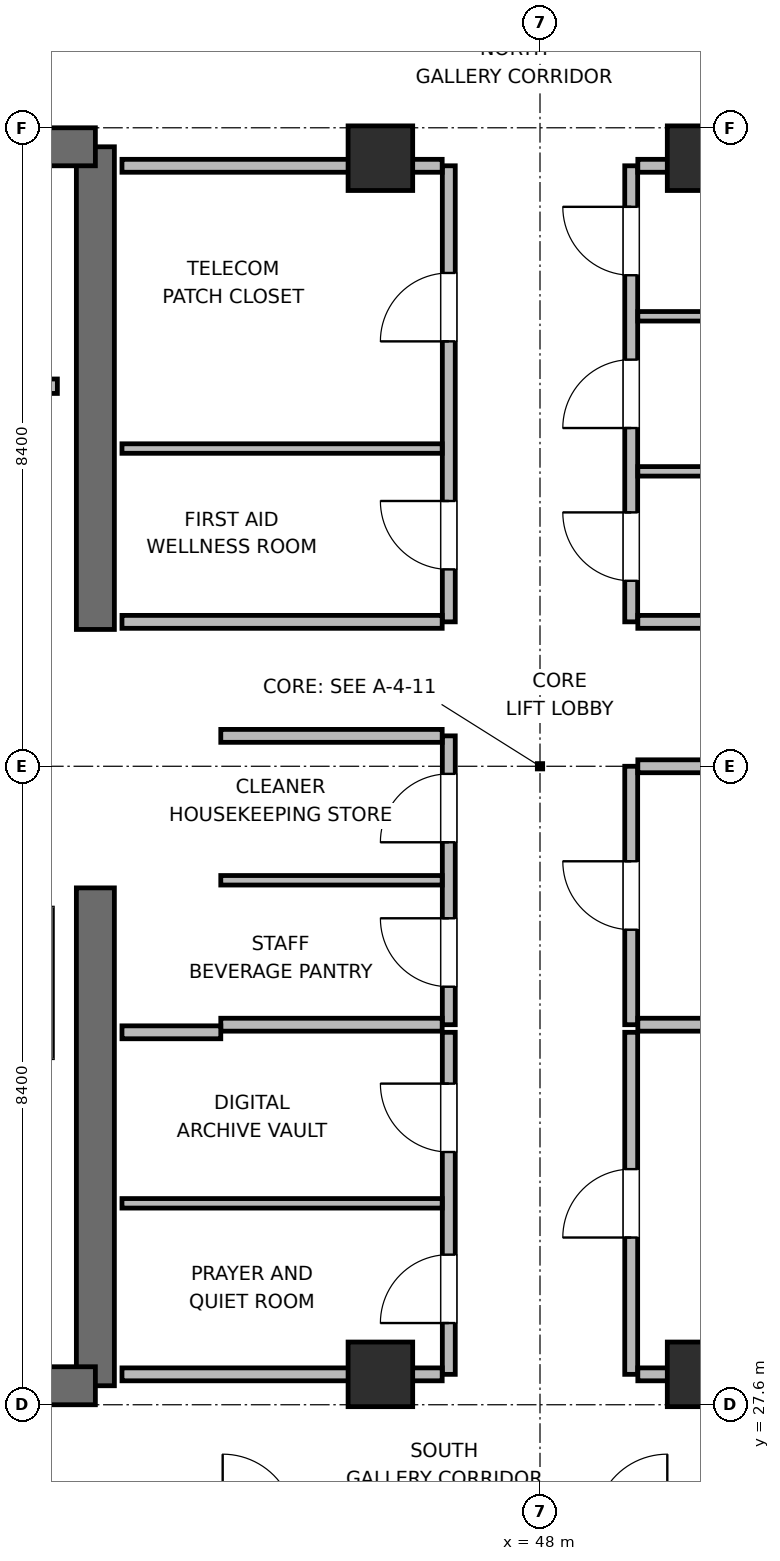
"""IFC4 building model, lengths in metres.
Left out: names, types, materials, properties, quantities, classifications, styles, units other than length and angle.
Written with IfcOpenShell. Run it as: python <this file> out.ifc"""

import sys

from ifc_helpers import new_model, si_unit, direction, frame, frame_2d, origin, origin_2d, place, context, subcontext, project, spatial, rectangle, extrude, element, fill, save


model = new_model("IFC4")
c1 = context("Model", 3, precision=1e-05, world=origin(), true_north=direction((0.0, 1.0)))
c2 = subcontext(c1, "Body", "Model", "MODEL_VIEW")
j1 = project(units=[si_unit("LENGTHUNIT", "METRE"), si_unit("PLANEANGLEUNIT", "RADIAN")], contexts=[c1])
p1 = place(None, origin())
s1 = spatial("IfcSite", under=j1, at=p1, CompositionType="ELEMENT")
p2 = place(p1, origin())
s2 = spatial("IfcBuilding", under=s1, at=p2, CompositionType="ELEMENT")
p3 = place(p2, frame((0.0, 0.0, 302.4)))
s3 = spatial("IfcBuildingStorey", under=s2, at=p3, CompositionType="ELEMENT", Elevation=302.4)
p4 = place(p3, frame((42.15, 27.85, 0.0), z_axis=(0.0, 0.0, 1.0), x_axis=(0.0, 1.0, 0.0)))
e1 = element("IfcWall", 1, at=p4, inside=s3, PredefinedType="SHEAR", context=c2, shape_type="SweptSolid", body=[
    extrude(rectangle(XDim=6.55, YDim=0.5, at=frame_2d((3.275, 0.0))), origin(), (0.0, 0.0, 1.0), 3.9),
])
p5 = place(p3, frame((42.15, 37.8, 0.0), z_axis=(0.0, 0.0, 1.0), x_axis=(0.0, 1.0, 0.0)))
e2 = element("IfcWall", 2, at=p5, inside=s3, PredefinedType="SHEAR", context=c2, shape_type="SweptSolid", body=[
    extrude(rectangle(XDim=6.35, YDim=0.5, at=frame_2d((3.175, 0.0))), origin(), (0.0, 0.0, 1.0), 3.9),
])
p6 = place(p3, frame((32.65, 27.85, 0.0), z_axis=(0.0, 0.0, 1.0), x_axis=(1.0, 0.0, 0.0)))
e3 = element("IfcWall", 3, at=p6, inside=s3, PredefinedType="SHEAR", context=c2, shape_type="SweptSolid", body=[
    extrude(rectangle(XDim=9.5, YDim=0.5, at=frame_2d((4.75, 0.0))), origin(), (0.0, 0.0, 1.0), 3.9),
])
p7 = place(p6, frame((5.075, 0.0, 0.0)))
e4 = element("IfcOpeningElement", 4, at=p7, cuts=e3, PredefinedType="OPENING", context=c2, shape_type="SweptSolid", body=[
    extrude(rectangle(XDim=1.05, YDim=2.04, at=frame_2d((0.525, 1.02))), frame((0.0, 0.26, 0.0), z_axis=(0.0, -1.0, 0.0), x_axis=(1.0, 0.0, 0.0)), (0.0, 0.0, 1.0), 0.52),
])
p8 = place(p3, frame((32.65, 44.15, 0.0), z_axis=(0.0, 0.0, 1.0), x_axis=(1.0, 0.0, 0.0)))
e5 = element("IfcWall", 5, at=p8, inside=s3, PredefinedType="SHEAR", context=c2, shape_type="SweptSolid", body=[
    extrude(rectangle(XDim=9.5, YDim=0.5, at=frame_2d((4.75, 0.0))), origin(), (0.0, 0.0, 1.0), 3.9),
])
p9 = place(p8, frame((1.075, 0.0, 0.0)))
e6 = element("IfcOpeningElement", 6, at=p9, cuts=e5, PredefinedType="OPENING", context=c2, shape_type="SweptSolid", body=[
    extrude(rectangle(XDim=0.95, YDim=2.04, at=frame_2d((0.475, 1.02))), frame((0.0, 0.26, 0.0), z_axis=(0.0, -1.0, 0.0), x_axis=(1.0, 0.0, 0.0)), (0.0, 0.0, 1.0), 0.52),
])
p10 = place(p8, frame((4.325, 0.0, 0.0)))
e7 = element("IfcOpeningElement", 7, at=p10, cuts=e5, PredefinedType="OPENING", context=c2, shape_type="SweptSolid", body=[
    extrude(rectangle(XDim=0.9, YDim=2.02, at=frame_2d((0.45, 1.01))), frame((0.0, 0.26, 0.0), z_axis=(0.0, -1.0, 0.0), x_axis=(1.0, 0.0, 0.0)), (0.0, 0.0, 1.0), 0.52),
])
p11 = place(p8, frame((7.225, 0.0, 0.0)))
e8 = element("IfcOpeningElement", 8, at=p11, cuts=e5, PredefinedType="OPENING", context=c2, shape_type="SweptSolid", body=[
    extrude(rectangle(XDim=0.9, YDim=2.02, at=frame_2d((0.45, 1.01))), frame((0.0, 0.26, 0.0), z_axis=(0.0, -1.0, 0.0), x_axis=(1.0, 0.0, 0.0)), (0.0, 0.0, 1.0), 0.52),
])
for number, where, z_axis, x_axis in (
    (9, (45.9, 28.0, 0.0), (0.0, 0.0, 1.0), (1.0, 0.0, 0.0)),
    (10, (50.1, 28.0, 0.0), (0.0, 0.0, 1.0), (1.0, 0.0, 0.0)),
    (11, (45.9, 44.0, 0.0), (0.0, 0.0, 1.0), (1.0, 0.0, 0.0)),
    (12, (50.1, 44.0, 0.0), (0.0, 0.0, 1.0), (1.0, 0.0, 0.0)),
):
    element("IfcColumn", number, at=place(p3, frame(where, z_axis=z_axis, x_axis=x_axis)), inside=s3, PredefinedType="COLUMN", context=c2, shape_type="SweptSolid", body=[
        extrude(rectangle(XDim=0.85, YDim=0.85, at=origin_2d()), origin(), (0.0, 0.0, 1.0), 3.9),
    ])
p12 = place(p3, frame((33.15, 41.0, 0.0), z_axis=(0.0, 0.0, 1.0), x_axis=(1.0, 0.0, 0.0)))
e13 = element("IfcWall", 13, at=p12, inside=s3, PredefinedType="PLUMBINGWALL", context=c2, shape_type="SweptSolid", body=[
    extrude(rectangle(XDim=8.5, YDim=0.19, at=frame_2d((4.25, 0.0))), origin(), (0.0, 0.0, 1.0), 3.68),
])
p13 = place(p3, frame((46.8, 32.6, 0.0), z_axis=(0.0, 0.0, 1.0), x_axis=(0.0, 1.0, 0.0)))
e14 = element("IfcWall", 14, at=p13, inside=s3, PredefinedType="PARTITIONING", context=c2, shape_type="SweptSolid", body=[
    extrude(rectangle(XDim=3.8, YDim=0.17, at=frame_2d((1.9, 0.0))), origin(), (0.0, 0.0, 1.0), 3.68),
])
p14 = place(p13, frame((0.5, 0.0, 0.0)))
e15 = element("IfcOpeningElement", 15, at=p14, cuts=e14, PredefinedType="OPENING", context=c2, shape_type="SweptSolid", body=[
    extrude(rectangle(XDim=0.9, YDim=2.02, at=frame_2d((0.45, 1.01))), frame((0.0, 0.095, 0.0), z_axis=(0.0, -1.0, 0.0), x_axis=(1.0, 0.0, 0.0)), (0.0, 0.0, 1.0), 0.19),
])
p15 = place(p13, frame((2.4, 0.0, 0.0)))
e16 = element("IfcOpeningElement", 16, at=p15, cuts=e14, PredefinedType="OPENING", context=c2, shape_type="SweptSolid", body=[
    extrude(rectangle(XDim=0.9, YDim=2.02, at=frame_2d((0.45, 1.01))), frame((0.0, 0.095, 0.0), z_axis=(0.0, -1.0, 0.0), x_axis=(1.0, 0.0, 0.0)), (0.0, 0.0, 1.0), 0.19),
])
for number, where, z_axis, x_axis in (
    (17, (43.8, 32.6, 0.0), (0.0, 0.0, 1.0), (1.0, 0.0, 0.0)),
    (18, (43.8, 36.4, 0.0), (0.0, 0.0, 1.0), (1.0, 0.0, 0.0)),
):
    element("IfcWall", number, at=place(p3, frame(where, z_axis=z_axis, x_axis=x_axis)), inside=s3, PredefinedType="PARTITIONING", context=c2, shape_type="SweptSolid", body=[
        extrude(rectangle(XDim=2.913, YDim=0.17, at=frame_2d((1.457, 0.0))), origin(), (0.0, 0.0, 1.0), 3.68),
    ])
p16 = place(p3, frame((43.8, 34.5, 0.0), z_axis=(0.0, 0.0, 1.0), x_axis=(1.0, 0.0, 0.0)))
e19 = element("IfcWall", 19, at=p16, inside=s3, PredefinedType="PARTITIONING", context=c2, shape_type="SweptSolid", body=[
    extrude(rectangle(XDim=2.913, YDim=0.125, at=frame_2d((1.457, 0.0))), origin(), (0.0, 0.0, 1.0), 3.68),
])
p17 = place(p3, frame((49.2, 32.6, 0.0), z_axis=(0.0, 0.0, 1.0), x_axis=(0.0, 1.0, 0.0)))
e20 = element("IfcWall", 20, at=p17, inside=s3, PredefinedType="PARTITIONING", context=c2, shape_type="SweptSolid", body=[
    extrude(rectangle(XDim=3.4, YDim=0.17, at=frame_2d((1.7, 0.0))), origin(), (0.0, 0.0, 1.0), 3.68),
])
p18 = place(p17, frame((1.25, 0.0, 0.0)))
e21 = element("IfcOpeningElement", 21, at=p18, cuts=e20, PredefinedType="OPENING", context=c2, shape_type="SweptSolid", body=[
    extrude(rectangle(XDim=0.9, YDim=2.02, at=frame_2d((0.45, 1.01))), frame((0.0, 0.095, 0.0), z_axis=(0.0, -1.0, 0.0), x_axis=(1.0, 0.0, 0.0)), (0.0, 0.0, 1.0), 0.19),
])
for number, where, z_axis, x_axis in (
    (22, (49.287, 32.6, 0.0), (0.0, 0.0, 1.0), (1.0, 0.0, 0.0)),
    (23, (49.287, 36.0, 0.0), (0.0, 0.0, 1.0), (1.0, 0.0, 0.0)),
):
    element("IfcWall", number, at=place(p3, frame(where, z_axis=z_axis, x_axis=x_axis)), inside=s3, PredefinedType="PARTITIONING", context=c2, shape_type="SweptSolid", body=[
        extrude(rectangle(XDim=2.913, YDim=0.17, at=frame_2d((1.457, 0.0))), origin(), (0.0, 0.0, 1.0), 3.68),
    ])
p19 = place(p3, frame((46.8, 28.0, 0.0), z_axis=(0.0, 0.0, 1.0), x_axis=(0.0, 1.0, 0.0)))
e24 = element("IfcWall", 24, at=p19, inside=s3, PredefinedType="PARTITIONING", context=c2, shape_type="SweptSolid", body=[
    extrude(rectangle(XDim=4.5, YDim=0.17, at=frame_2d((2.25, 0.0))), origin(), (0.0, 0.0, 1.0), 3.68),
])
p20 = place(p19, frame((0.675, 0.0, 0.0)))
e25 = element("IfcOpeningElement", 25, at=p20, cuts=e24, PredefinedType="OPENING", context=c2, shape_type="SweptSolid", body=[
    extrude(rectangle(XDim=0.9, YDim=2.02, at=frame_2d((0.45, 1.01))), frame((0.0, 0.095, 0.0), z_axis=(0.0, -1.0, 0.0), x_axis=(1.0, 0.0, 0.0)), (0.0, 0.0, 1.0), 0.19),
])
p21 = place(p19, frame((2.925, 0.0, 0.0)))
e26 = element("IfcOpeningElement", 26, at=p21, cuts=e24, PredefinedType="OPENING", context=c2, shape_type="SweptSolid", body=[
    extrude(rectangle(XDim=0.9, YDim=2.02, at=frame_2d((0.45, 1.01))), frame((0.0, 0.095, 0.0), z_axis=(0.0, -1.0, 0.0), x_axis=(1.0, 0.0, 0.0)), (0.0, 0.0, 1.0), 0.19),
])
p22 = place(p3, frame((42.5, 28.0, 0.0), z_axis=(0.0, 0.0, 1.0), x_axis=(1.0, 0.0, 0.0)))
e27 = element("IfcWall", 27, at=p22, inside=s3, PredefinedType="PARTITIONING", context=c2, shape_type="SweptSolid", body=[
    extrude(rectangle(XDim=4.213, YDim=0.17, at=frame_2d((2.106, 0.0))), origin(), (0.0, 0.0, 1.0), 2.765),
])
p23 = place(p3, frame((42.5, 32.5, 0.0), z_axis=(0.0, 0.0, 1.0), x_axis=(1.0, 0.0, 0.0)))
e28 = element("IfcWall", 28, at=p23, inside=s3, PredefinedType="PARTITIONING", context=c2, shape_type="SweptSolid", body=[
    extrude(rectangle(XDim=1.3, YDim=0.17, at=frame_2d((0.65, 0.0))), origin(), (0.0, 0.0, 1.0), 3.68),
])
p24 = place(p3, frame((42.5, 30.25, 0.0), z_axis=(0.0, 0.0, 1.0), x_axis=(1.0, 0.0, 0.0)))
e29 = element("IfcWall", 29, at=p24, inside=s3, PredefinedType="PARTITIONING", context=c2, shape_type="SweptSolid", body=[
    extrude(rectangle(XDim=4.213, YDim=0.125, at=frame_2d((2.106, 0.0))), origin(), (0.0, 0.0, 1.0), 3.68),
])
p25 = place(p3, frame((49.2, 28.0, 0.0), z_axis=(0.0, 0.0, 1.0), x_axis=(0.0, 1.0, 0.0)))
e30 = element("IfcWall", 30, at=p25, inside=s3, PredefinedType="PARTITIONING", context=c2, shape_type="SweptSolid", body=[
    extrude(rectangle(XDim=4.5, YDim=0.17, at=frame_2d((2.25, 0.0))), origin(), (0.0, 0.0, 1.0), 3.68),
])
p26 = place(p25, frame((1.8, 0.0, 0.0)))
e31 = element("IfcOpeningElement", 31, at=p26, cuts=e30, PredefinedType="OPENING", context=c2, shape_type="SweptSolid", body=[
    extrude(rectangle(XDim=0.9, YDim=2.02, at=frame_2d((0.45, 1.01))), frame((0.0, 0.095, 0.0), z_axis=(0.0, -1.0, 0.0), x_axis=(1.0, 0.0, 0.0)), (0.0, 0.0, 1.0), 0.19),
])
p27 = place(p3, frame((49.287, 28.0, 0.0), z_axis=(0.0, 0.0, 1.0), x_axis=(1.0, 0.0, 0.0)))
e32 = element("IfcWall", 32, at=p27, inside=s3, PredefinedType="PARTITIONING", context=c2, shape_type="SweptSolid", body=[
    extrude(rectangle(XDim=4.213, YDim=0.17, at=frame_2d((2.106, 0.0))), origin(), (0.0, 0.0, 1.0), 2.765),
])
p28 = place(p3, frame((46.8, 37.9, 0.0), z_axis=(0.0, 0.0, 1.0), x_axis=(0.0, 1.0, 0.0)))
e33 = element("IfcWall", 33, at=p28, inside=s3, PredefinedType="PARTITIONING", context=c2, shape_type="SweptSolid", body=[
    extrude(rectangle(XDim=6.0, YDim=0.17, at=frame_2d((3.0, 0.0))), origin(), (0.0, 0.0, 1.0), 3.68),
])
p29 = place(p28, frame((0.69, 0.0, 0.0)))
e34 = element("IfcOpeningElement", 34, at=p29, cuts=e33, PredefinedType="OPENING", context=c2, shape_type="SweptSolid", body=[
    extrude(rectangle(XDim=0.9, YDim=2.02, at=frame_2d((0.45, 1.01))), frame((0.0, 0.095, 0.0), z_axis=(0.0, -1.0, 0.0), x_axis=(1.0, 0.0, 0.0)), (0.0, 0.0, 1.0), 0.19),
])
p30 = place(p28, frame((3.69, 0.0, 0.0)))
e35 = element("IfcOpeningElement", 35, at=p30, cuts=e33, PredefinedType="OPENING", context=c2, shape_type="SweptSolid", body=[
    extrude(rectangle(XDim=0.9, YDim=2.02, at=frame_2d((0.45, 1.01))), frame((0.0, 0.095, 0.0), z_axis=(0.0, -1.0, 0.0), x_axis=(1.0, 0.0, 0.0)), (0.0, 0.0, 1.0), 0.19),
])
p31 = place(p3, frame((42.5, 37.9, 0.0), z_axis=(0.0, 0.0, 1.0), x_axis=(1.0, 0.0, 0.0)))
e36 = element("IfcWall", 36, at=p31, inside=s3, PredefinedType="PARTITIONING", context=c2, shape_type="SweptSolid", body=[
    extrude(rectangle(XDim=4.213, YDim=0.17, at=frame_2d((2.106, 0.0))), origin(), (0.0, 0.0, 1.0), 3.68),
])
p32 = place(p3, frame((42.5, 43.9, 0.0), z_axis=(0.0, 0.0, 1.0), x_axis=(1.0, 0.0, 0.0)))
e37 = element("IfcWall", 37, at=p32, inside=s3, PredefinedType="PARTITIONING", context=c2, shape_type="SweptSolid", body=[
    extrude(rectangle(XDim=4.213, YDim=0.17, at=frame_2d((2.106, 0.0))), origin(), (0.0, 0.0, 1.0), 2.765),
])
p33 = place(p3, frame((42.5, 40.18, 0.0), z_axis=(0.0, 0.0, 1.0), x_axis=(1.0, 0.0, 0.0)))
e38 = element("IfcWall", 38, at=p33, inside=s3, PredefinedType="PARTITIONING", context=c2, shape_type="SweptSolid", body=[
    extrude(rectangle(XDim=4.213, YDim=0.125, at=frame_2d((2.106, 0.0))), origin(), (0.0, 0.0, 1.0), 3.68),
])
p34 = place(p3, frame((49.2, 37.9, 0.0), z_axis=(0.0, 0.0, 1.0), x_axis=(0.0, 1.0, 0.0)))
e39 = element("IfcWall", 39, at=p34, inside=s3, PredefinedType="PARTITIONING", context=c2, shape_type="SweptSolid", body=[
    extrude(rectangle(XDim=6.0, YDim=0.17, at=frame_2d((3.0, 0.0))), origin(), (0.0, 0.0, 1.0), 3.68),
])
p35 = place(p34, frame((0.54, 0.0, 0.0)))
e40 = element("IfcOpeningElement", 40, at=p35, cuts=e39, PredefinedType="OPENING", context=c2, shape_type="SweptSolid", body=[
    extrude(rectangle(XDim=0.9, YDim=2.02, at=frame_2d((0.45, 1.01))), frame((0.0, 0.095, 0.0), z_axis=(0.0, -1.0, 0.0), x_axis=(1.0, 0.0, 0.0)), (0.0, 0.0, 1.0), 0.19),
])
p36 = place(p34, frame((2.55, 0.0, 0.0)))
e41 = element("IfcOpeningElement", 41, at=p36, cuts=e39, PredefinedType="OPENING", context=c2, shape_type="SweptSolid", body=[
    extrude(rectangle(XDim=0.9, YDim=2.02, at=frame_2d((0.45, 1.01))), frame((0.0, 0.095, 0.0), z_axis=(0.0, -1.0, 0.0), x_axis=(1.0, 0.0, 0.0)), (0.0, 0.0, 1.0), 0.19),
])
p37 = place(p34, frame((4.56, 0.0, 0.0)))
e42 = element("IfcOpeningElement", 42, at=p37, cuts=e39, PredefinedType="OPENING", context=c2, shape_type="SweptSolid", body=[
    extrude(rectangle(XDim=0.9, YDim=2.02, at=frame_2d((0.45, 1.01))), frame((0.0, 0.095, 0.0), z_axis=(0.0, -1.0, 0.0), x_axis=(1.0, 0.0, 0.0)), (0.0, 0.0, 1.0), 0.19),
])
p38 = place(p3, frame((49.287, 37.9, 0.0), z_axis=(0.0, 0.0, 1.0), x_axis=(1.0, 0.0, 0.0)))
e43 = element("IfcWall", 43, at=p38, inside=s3, PredefinedType="PARTITIONING", context=c2, shape_type="SweptSolid", body=[
    extrude(rectangle(XDim=4.113, YDim=0.17, at=frame_2d((2.056, 0.0))), origin(), (0.0, 0.0, 1.0), 3.68),
])
p39 = place(p3, frame((49.287, 43.9, 0.0), z_axis=(0.0, 0.0, 1.0), x_axis=(1.0, 0.0, 0.0)))
e44 = element("IfcWall", 44, at=p39, inside=s3, PredefinedType="PARTITIONING", context=c2, shape_type="SweptSolid", body=[
    extrude(rectangle(XDim=4.113, YDim=0.17, at=frame_2d((2.056, 0.0))), origin(), (0.0, 0.0, 1.0), 2.765),
])
for number, where, z_axis, x_axis in (
    (45, (49.287, 39.88, 0.0), (0.0, 0.0, 1.0), (1.0, 0.0, 0.0)),
    (46, (49.287, 41.92, 0.0), (0.0, 0.0, 1.0), (1.0, 0.0, 0.0)),
):
    element("IfcWall", number, at=place(p3, frame(where, z_axis=z_axis, x_axis=x_axis)), inside=s3, PredefinedType="PARTITIONING", context=c2, shape_type="SweptSolid", body=[
        extrude(rectangle(XDim=4.113, YDim=0.125, at=frame_2d((2.056, 0.0))), origin(), (0.0, 0.0, 1.0), 3.68),
    ])
p40 = place(p14, origin())
e47 = element("IfcDoor", 47, at=p40, inside=s3, OperationType="SINGLE_SWING_RIGHT", PredefinedType="DOOR", context=c2, shape_type="SweptSolid", body=[
    extrude(rectangle(XDim=0.9, YDim=2.02, at=frame_2d((0.45, 1.01))), frame((0.0, 0.025, 0.0), z_axis=(0.0, -1.0, 0.0), x_axis=(1.0, 0.0, 0.0)), (0.0, 0.0, 1.0), 0.05),
])
fill(e15, e47)
p41 = place(p15, origin())
e48 = element("IfcDoor", 48, at=p41, inside=s3, OperationType="SINGLE_SWING_LEFT", PredefinedType="DOOR", context=c2, shape_type="SweptSolid", body=[
    extrude(rectangle(XDim=0.9, YDim=2.02, at=frame_2d((0.45, 1.01))), frame((0.0, 0.025, 0.0), z_axis=(0.0, -1.0, 0.0), x_axis=(1.0, 0.0, 0.0)), (0.0, 0.0, 1.0), 0.05),
])
fill(e16, e48)
p42 = place(p18, origin())
e49 = element("IfcDoor", 49, at=p42, inside=s3, OperationType="SINGLE_SWING_RIGHT", PredefinedType="DOOR", context=c2, shape_type="SweptSolid", body=[
    extrude(rectangle(XDim=0.9, YDim=2.02, at=frame_2d((0.45, 1.01))), frame((0.0, 0.025, 0.0), z_axis=(0.0, -1.0, 0.0), x_axis=(1.0, 0.0, 0.0)), (0.0, 0.0, 1.0), 0.05),
])
fill(e21, e49)
p43 = place(p20, origin())
e50 = element("IfcDoor", 50, at=p43, inside=s3, OperationType="SINGLE_SWING_LEFT", PredefinedType="DOOR", context=c2, shape_type="SweptSolid", body=[
    extrude(rectangle(XDim=0.9, YDim=2.02, at=frame_2d((0.45, 1.01))), frame((0.0, 0.025, 0.0), z_axis=(0.0, -1.0, 0.0), x_axis=(1.0, 0.0, 0.0)), (0.0, 0.0, 1.0), 0.05),
])
fill(e25, e50)
p44 = place(p21, origin())
e51 = element("IfcDoor", 51, at=p44, inside=s3, OperationType="SINGLE_SWING_RIGHT", PredefinedType="DOOR", context=c2, shape_type="SweptSolid", body=[
    extrude(rectangle(XDim=0.9, YDim=2.02, at=frame_2d((0.45, 1.01))), frame((0.0, 0.025, 0.0), z_axis=(0.0, -1.0, 0.0), x_axis=(1.0, 0.0, 0.0)), (0.0, 0.0, 1.0), 0.05),
])
fill(e26, e51)
p45 = place(p26, origin())
e52 = element("IfcDoor", 52, at=p45, inside=s3, OperationType="SINGLE_SWING_LEFT", PredefinedType="DOOR", context=c2, shape_type="SweptSolid", body=[
    extrude(rectangle(XDim=0.9, YDim=2.02, at=frame_2d((0.45, 1.01))), frame((0.0, 0.025, 0.0), z_axis=(0.0, -1.0, 0.0), x_axis=(1.0, 0.0, 0.0)), (0.0, 0.0, 1.0), 0.05),
])
fill(e31, e52)
p46 = place(p29, origin())
e53 = element("IfcDoor", 53, at=p46, inside=s3, OperationType="SINGLE_SWING_RIGHT", PredefinedType="DOOR", context=c2, shape_type="SweptSolid", body=[
    extrude(rectangle(XDim=0.9, YDim=2.02, at=frame_2d((0.45, 1.01))), frame((0.0, 0.025, 0.0), z_axis=(0.0, -1.0, 0.0), x_axis=(1.0, 0.0, 0.0)), (0.0, 0.0, 1.0), 0.05),
])
fill(e34, e53)
p47 = place(p30, origin())
e54 = element("IfcDoor", 54, at=p47, inside=s3, OperationType="SINGLE_SWING_LEFT", PredefinedType="DOOR", context=c2, shape_type="SweptSolid", body=[
    extrude(rectangle(XDim=0.9, YDim=2.02, at=frame_2d((0.45, 1.01))), frame((0.0, 0.025, 0.0), z_axis=(0.0, -1.0, 0.0), x_axis=(1.0, 0.0, 0.0)), (0.0, 0.0, 1.0), 0.05),
])
fill(e35, e54)
p48 = place(p35, origin())
e55 = element("IfcDoor", 55, at=p48, inside=s3, OperationType="SINGLE_SWING_RIGHT", PredefinedType="DOOR", context=c2, shape_type="SweptSolid", body=[
    extrude(rectangle(XDim=0.9, YDim=2.02, at=frame_2d((0.45, 1.01))), frame((0.0, 0.025, 0.0), z_axis=(0.0, -1.0, 0.0), x_axis=(1.0, 0.0, 0.0)), (0.0, 0.0, 1.0), 0.05),
])
fill(e40, e55)
p49 = place(p36, origin())
e56 = element("IfcDoor", 56, at=p49, inside=s3, OperationType="SINGLE_SWING_LEFT", PredefinedType="DOOR", context=c2, shape_type="SweptSolid", body=[
    extrude(rectangle(XDim=0.9, YDim=2.02, at=frame_2d((0.45, 1.01))), frame((0.0, 0.025, 0.0), z_axis=(0.0, -1.0, 0.0), x_axis=(1.0, 0.0, 0.0)), (0.0, 0.0, 1.0), 0.05),
])
fill(e41, e56)
p50 = place(p37, origin())
e57 = element("IfcDoor", 57, at=p50, inside=s3, OperationType="SINGLE_SWING_RIGHT", PredefinedType="DOOR", context=c2, shape_type="SweptSolid", body=[
    extrude(rectangle(XDim=0.9, YDim=2.02, at=frame_2d((0.45, 1.01))), frame((0.0, 0.025, 0.0), z_axis=(0.0, -1.0, 0.0), x_axis=(1.0, 0.0, 0.0)), (0.0, 0.0, 1.0), 0.05),
])
fill(e42, e57)
save(model, sys.argv[1])
